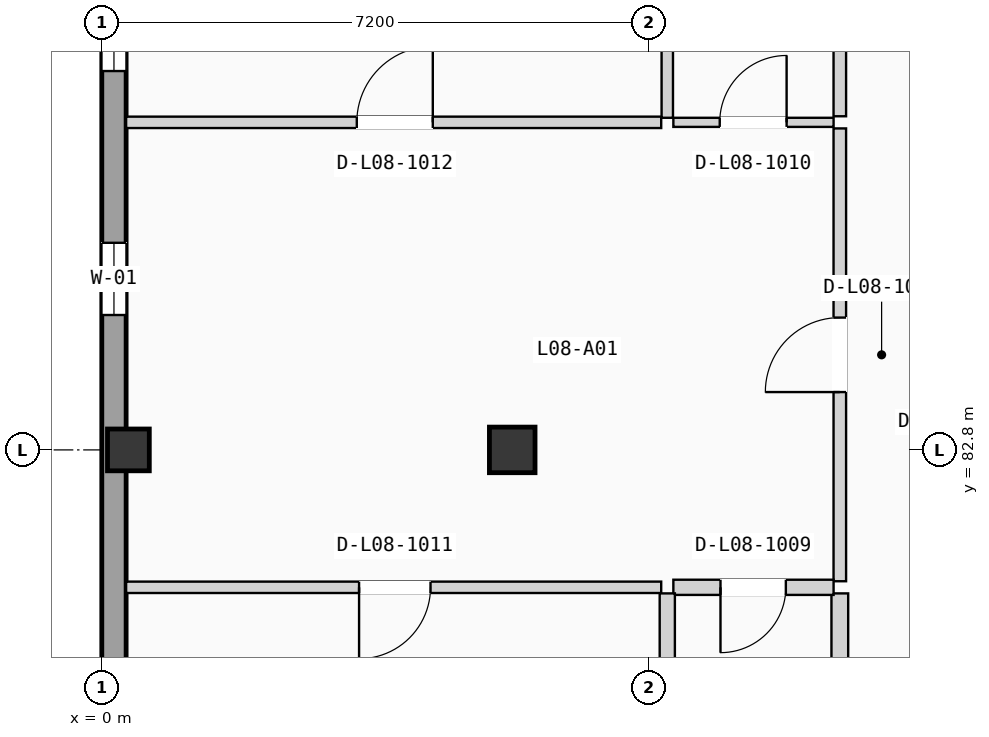
"""IFC4 building model, lengths in metres.
Left out: names, types, materials, properties, quantities, classifications, styles, units other than length and angle.
Written with IfcOpenShell. Run it as: python <this file> out.ifc"""

import sys

from ifc_helpers import new_model, si_unit, direction, frame, frame_2d, origin, origin_2d, place, context, subcontext, project, spatial, rectangle, extrude, element, fill, save


model = new_model("IFC4")
c1 = context("Model", 3, precision=1e-05, world=origin(), true_north=direction((0.0, 1.0)))
c2 = subcontext(c1, "Body", "Model", "MODEL_VIEW")
j1 = project(units=[si_unit("LENGTHUNIT", "METRE"), si_unit("PLANEANGLEUNIT", "RADIAN")], contexts=[c1])
p1 = place(None, origin())
s1 = spatial("IfcSite", under=j1, at=p1, CompositionType="ELEMENT")
p2 = place(p1, origin())
s2 = spatial("IfcBuilding", under=s1, at=p2, CompositionType="ELEMENT")
p3 = place(p2, frame((0.0, 0.0, 27.825)))
s3 = spatial("IfcBuildingStorey", under=s2, at=p3, CompositionType="ELEMENT", Elevation=27.825)
p4 = place(p3, frame((0.35, 82.8, 0.0), z_axis=(0.0, 0.0, 1.0), x_axis=(1.0, 0.0, 0.0)))
e1 = element("IfcColumn", 1, at=p4, inside=s3, PredefinedType="COLUMN", context=c2, shape_type="SweptSolid", body=[
    extrude(rectangle(XDim=0.55, YDim=0.55, at=origin_2d()), origin(), (0.0, 0.0, 1.0), 3.15),
])
p5 = place(p3, frame((5.4, 82.8, 0.0), z_axis=(0.0, 0.0, 1.0), x_axis=(1.0, 0.0, 0.0)))
e2 = element("IfcColumn", 2, at=p5, inside=s3, PredefinedType="COLUMN", context=c2, shape_type="SweptSolid", body=[
    extrude(rectangle(XDim=0.6, YDim=0.6, at=origin_2d()), origin(), (0.0, 0.0, 1.0), 3.15),
])
p6 = place(p3, frame((0.16, 68.72, 0.0), z_axis=(0.0, 0.0, 1.0), x_axis=(0.0, 1.0, 0.0)))
e3 = element("IfcWall", 3, at=p6, inside=s3, PredefinedType="SOLIDWALL", context=c2, shape_type="SweptSolid", body=[
    extrude(rectangle(XDim=49.76, YDim=0.32, at=frame_2d((24.88, 0.0))), origin(), (0.0, 0.0, 1.0), 2.89),
])
p7 = place(p6, frame((15.855, 0.0, 0.85)))
e4 = element("IfcOpeningElement", 4, at=p7, cuts=e3, PredefinedType="OPENING", context=c2, shape_type="SweptSolid", body=[
    extrude(rectangle(XDim=0.95, YDim=1.2, at=frame_2d((0.475, 0.6))), frame((0.0, 0.17, 0.0), z_axis=(0.0, -1.0, 0.0), x_axis=(1.0, 0.0, 0.0)), (0.0, 0.0, 1.0), 0.34),
])
p8 = place(p6, frame((9.061, 0.0, 0.9)))
e5 = element("IfcOpeningElement", 5, at=p8, cuts=e3, PredefinedType="OPENING", context=c2, shape_type="SweptSolid", body=[
    extrude(rectangle(XDim=1.35, YDim=1.2, at=frame_2d((0.675, 0.6))), frame((0.0, 0.17, 0.0), z_axis=(0.0, -1.0, 0.0), x_axis=(1.0, 0.0, 0.0)), (0.0, 0.0, 1.0), 0.34),
])
p9 = place(p6, frame((19.065, 0.0, 0.855)))
e6 = element("IfcOpeningElement", 6, at=p9, cuts=e3, PredefinedType="OPENING", context=c2, shape_type="SweptSolid", body=[
    extrude(rectangle(XDim=1.35, YDim=1.35, at=frame_2d((0.675, 0.675))), frame((0.0, 0.17, 0.0), z_axis=(0.0, -1.0, 0.0), x_axis=(1.0, 0.0, 0.0)), (0.0, 0.0, 1.0), 0.34),
])
p10 = place(p6, frame((31.784, 0.0, 0.705)))
e7 = element("IfcOpeningElement", 7, at=p10, cuts=e3, PredefinedType="OPENING", context=c2, shape_type="SweptSolid", body=[
    extrude(rectangle(XDim=1.35, YDim=1.5, at=frame_2d((0.675, 0.75))), frame((0.0, 0.17, 0.0), z_axis=(0.0, -1.0, 0.0), x_axis=(1.0, 0.0, 0.0)), (0.0, 0.0, 1.0), 0.34),
])
p11 = place(p6, frame((25.211, 0.0, 0.555)))
e8 = element("IfcOpeningElement", 8, at=p11, cuts=e3, PredefinedType="OPENING", context=c2, shape_type="SweptSolid", body=[
    extrude(rectangle(XDim=1.35, YDim=1.65, at=frame_2d((0.675, 0.825))), frame((0.0, 0.17, 0.0), z_axis=(0.0, -1.0, 0.0), x_axis=(1.0, 0.0, 0.0)), (0.0, 0.0, 1.0), 0.34),
])
p12 = place(p6, frame((39.113, 0.0, 0.85)))
e9 = element("IfcOpeningElement", 9, at=p12, cuts=e3, PredefinedType="OPENING", context=c2, shape_type="SweptSolid", body=[
    extrude(rectangle(XDim=0.95, YDim=1.2, at=frame_2d((0.475, 0.6))), frame((0.0, 0.17, 0.0), z_axis=(0.0, -1.0, 0.0), x_axis=(1.0, 0.0, 0.0)), (0.0, 0.0, 1.0), 0.34),
])
p13 = place(p3, frame((9.71, 81.072, 0.0), z_axis=(0.0, 0.0, 1.0), x_axis=(0.0, 1.0, 0.0)))
e10 = element("IfcWall", 10, at=p13, inside=s3, PredefinedType="PARTITIONING", context=c2, shape_type="SweptSolid", body=[
    extrude(rectangle(XDim=5.958, YDim=0.165, at=frame_2d((2.979, 0.0))), origin(), (0.0, 0.0, 1.0), 2.87),
])
p14 = place(p13, frame((2.489, 0.0, 0.0)))
e11 = element("IfcOpeningElement", 11, at=p14, cuts=e10, PredefinedType="OPENING", context=c2, shape_type="SweptSolid", body=[
    extrude(rectangle(XDim=0.98, YDim=2.08, at=frame_2d((0.49, 1.04))), frame((0.0, 0.093, 0.0), z_axis=(0.0, -1.0, 0.0), x_axis=(1.0, 0.0, 0.0)), (0.0, 0.0, 1.0), 0.185),
])
p15 = place(p3, frame((9.71, 76.0, 0.0), z_axis=(0.0, 0.0, 1.0), x_axis=(0.0, 1.0, 0.0)))
e12 = element("IfcWall", 12, at=p15, inside=s3, PredefinedType="PLUMBINGWALL", context=c2, shape_type="SweptSolid", body=[
    extrude(rectangle(XDim=4.912, YDim=0.22, at=frame_2d((2.456, 0.0))), origin(), (0.0, 0.0, 1.0), 2.87),
])
p16 = place(p3, frame((9.71, 87.19, 0.0), z_axis=(0.0, 0.0, 1.0), x_axis=(0.0, 1.0, 0.0)))
e13 = element("IfcWall", 13, at=p16, inside=s3, PredefinedType="PARTITIONING", context=c2, shape_type="SweptSolid", body=[
    extrude(rectangle(XDim=4.912, YDim=0.165, at=frame_2d((2.456, 0.0))), origin(), (0.0, 0.0, 1.0), 2.87),
])
p17 = place(p3, frame((7.52, 80.992, 0.0), z_axis=(0.0, 0.0, 1.0), x_axis=(1.0, 0.0, 0.0)))
e14 = element("IfcWall", 14, at=p17, inside=s3, PredefinedType="PLUMBINGWALL", context=c2, shape_type="SweptSolid", body=[
    extrude(rectangle(XDim=2.108, YDim=0.2, at=frame_2d((1.054, 0.0))), origin(), (0.0, 0.0, 1.0), 2.87),
])
p18 = place(p17, frame((0.62, 0.0, 0.0)))
e15 = element("IfcOpeningElement", 15, at=p18, cuts=e14, PredefinedType="OPENING", context=c2, shape_type="SweptSolid", body=[
    extrude(rectangle(XDim=0.86, YDim=2.0, at=frame_2d((0.43, 1.0))), frame((0.0, 0.11, 0.0), z_axis=(0.0, -1.0, 0.0), x_axis=(1.0, 0.0, 0.0)), (0.0, 0.0, 1.0), 0.22),
])
p19 = place(p3, frame((7.52, 87.11, 0.0), z_axis=(0.0, 0.0, 1.0), x_axis=(1.0, 0.0, 0.0)))
e16 = element("IfcWall", 16, at=p19, inside=s3, PredefinedType="PARTITIONING", context=c2, shape_type="SweptSolid", body=[
    extrude(rectangle(XDim=2.108, YDim=0.12, at=frame_2d((1.054, 0.0))), origin(), (0.0, 0.0, 1.0), 2.87),
])
p20 = place(p19, frame((0.61, 0.0, 0.0)))
e17 = element("IfcOpeningElement", 17, at=p20, cuts=e16, PredefinedType="OPENING", context=c2, shape_type="SweptSolid", body=[
    extrude(rectangle(XDim=0.88, YDim=2.02, at=frame_2d((0.44, 1.01))), frame((0.0, 0.07, 0.0), z_axis=(0.0, -1.0, 0.0), x_axis=(1.0, 0.0, 0.0)), (0.0, 0.0, 1.0), 0.14),
])
p21 = place(p3, frame((0.32, 80.992, 0.0), z_axis=(0.0, 0.0, 1.0), x_axis=(1.0, 0.0, 0.0)))
e18 = element("IfcWall", 18, at=p21, inside=s3, PredefinedType="PARTITIONING", context=c2, shape_type="SweptSolid", body=[
    extrude(rectangle(XDim=7.04, YDim=0.15, at=frame_2d((3.52, 0.0))), origin(), (0.0, 0.0, 1.0), 2.87),
])
p22 = place(p21, frame((3.065, 0.0, 0.0)))
e19 = element("IfcOpeningElement", 19, at=p22, cuts=e18, PredefinedType="OPENING", context=c2, shape_type="SweptSolid", body=[
    extrude(rectangle(XDim=0.94, YDim=2.06, at=frame_2d((0.47, 1.03))), frame((0.0, 0.085, 0.0), z_axis=(0.0, -1.0, 0.0), x_axis=(1.0, 0.0, 0.0)), (0.0, 0.0, 1.0), 0.17),
])
p23 = place(p3, frame((0.32, 87.11, 0.0), z_axis=(0.0, 0.0, 1.0), x_axis=(1.0, 0.0, 0.0)))
e20 = element("IfcWall", 20, at=p23, inside=s3, PredefinedType="PARTITIONING", context=c2, shape_type="SweptSolid", body=[
    extrude(rectangle(XDim=7.04, YDim=0.15, at=frame_2d((3.52, 0.0))), origin(), (0.0, 0.0, 1.0), 2.87),
])
p24 = place(p23, frame((3.035, 0.0, 0.0)))
e21 = element("IfcOpeningElement", 21, at=p24, cuts=e20, PredefinedType="OPENING", context=c2, shape_type="SweptSolid", body=[
    extrude(rectangle(XDim=1.0, YDim=2.06, at=frame_2d((0.5, 1.03))), frame((0.0, 0.085, 0.0), z_axis=(0.0, -1.0, 0.0), x_axis=(1.0, 0.0, 0.0)), (0.0, 0.0, 1.0), 0.17),
])
p25 = place(p3, frame((7.44, 76.0, 0.0), z_axis=(0.0, 0.0, 1.0), x_axis=(0.0, 1.0, 0.0)))
e22 = element("IfcWall", 22, at=p25, inside=s3, PredefinedType="PLUMBINGWALL", context=c2, shape_type="SweptSolid", body=[
    extrude(rectangle(XDim=4.912, YDim=0.2, at=frame_2d((2.456, 0.0))), origin(), (0.0, 0.0, 1.0), 2.87),
])
p26 = place(p3, frame((7.44, 87.17, 0.0), z_axis=(0.0, 0.0, 1.0), x_axis=(0.0, 1.0, 0.0)))
e23 = element("IfcWall", 23, at=p26, inside=s3, PredefinedType="PARTITIONING", context=c2, shape_type="SweptSolid", body=[
    extrude(rectangle(XDim=4.932, YDim=0.15, at=frame_2d((2.466, 0.0))), origin(), (0.0, 0.0, 1.0), 2.87),
])
p27 = place(p7, origin())
e24 = element("IfcWindow", 24, at=p27, inside=s3, PartitioningType="SINGLE_PANEL", PredefinedType="WINDOW", context=c2, shape_type="SweptSolid", body=[
    extrude(rectangle(XDim=0.95, YDim=1.2, at=frame_2d((0.475, 0.6))), frame((0.0, 0.03, 0.0), z_axis=(0.0, -1.0, 0.0), x_axis=(1.0, 0.0, 0.0)), (0.0, 0.0, 1.0), 0.06),
])
fill(e4, e24)
p28 = place(p9, origin())
e25 = element("IfcWindow", 25, at=p28, inside=s3, PartitioningType="SINGLE_PANEL", PredefinedType="WINDOW", context=c2, shape_type="SweptSolid", body=[
    extrude(rectangle(XDim=1.35, YDim=1.35, at=frame_2d((0.675, 0.675))), frame((0.0, 0.03, 0.0), z_axis=(0.0, -1.0, 0.0), x_axis=(1.0, 0.0, 0.0)), (0.0, 0.0, 1.0), 0.06),
])
fill(e6, e25)
p29 = place(p14, origin())
e26 = element("IfcDoor", 26, at=p29, inside=s3, OperationType="SINGLE_SWING_LEFT", PredefinedType="DOOR", context=c2, shape_type="SweptSolid", body=[
    extrude(rectangle(XDim=0.98, YDim=2.08, at=frame_2d((0.49, 1.04))), frame((0.0, 0.025, 0.0), z_axis=(0.0, -1.0, 0.0), x_axis=(1.0, 0.0, 0.0)), (0.0, 0.0, 1.0), 0.05),
])
fill(e11, e26)
p30 = place(p18, frame((0.86, 0.0, 0.0), z_axis=(0.0, 0.0, 1.0), x_axis=(-1.0, 0.0, 0.0)))
e27 = element("IfcDoor", 27, at=p30, inside=s3, OperationType="SINGLE_SWING_LEFT", PredefinedType="DOOR", context=c2, shape_type="SweptSolid", body=[
    extrude(rectangle(XDim=0.86, YDim=2.0, at=frame_2d((0.43, 1.0))), frame((0.0, 0.025, 0.0), z_axis=(0.0, -1.0, 0.0), x_axis=(1.0, 0.0, 0.0)), (0.0, 0.0, 1.0), 0.05),
])
fill(e15, e27)
p31 = place(p20, origin())
e28 = element("IfcDoor", 28, at=p31, inside=s3, OperationType="SINGLE_SWING_RIGHT", PredefinedType="DOOR", context=c2, shape_type="SweptSolid", body=[
    extrude(rectangle(XDim=0.88, YDim=2.02, at=frame_2d((0.44, 1.01))), frame((0.0, 0.025, 0.0), z_axis=(0.0, -1.0, 0.0), x_axis=(1.0, 0.0, 0.0)), (0.0, 0.0, 1.0), 0.05),
])
fill(e17, e28)
p32 = place(p22, frame((0.94, 0.0, 0.0), z_axis=(0.0, 0.0, 1.0), x_axis=(-1.0, 0.0, 0.0)))
e29 = element("IfcDoor", 29, at=p32, inside=s3, OperationType="SINGLE_SWING_LEFT", PredefinedType="DOOR", context=c2, shape_type="SweptSolid", body=[
    extrude(rectangle(XDim=0.94, YDim=2.06, at=frame_2d((0.47, 1.03))), frame((0.0, 0.025, 0.0), z_axis=(0.0, -1.0, 0.0), x_axis=(1.0, 0.0, 0.0)), (0.0, 0.0, 1.0), 0.05),
])
fill(e19, e29)
p33 = place(p24, origin())
e30 = element("IfcDoor", 30, at=p33, inside=s3, OperationType="SINGLE_SWING_RIGHT", PredefinedType="DOOR", context=c2, shape_type="SweptSolid", body=[
    extrude(rectangle(XDim=1.0, YDim=2.06, at=frame_2d((0.5, 1.03))), frame((0.0, 0.025, 0.0), z_axis=(0.0, -1.0, 0.0), x_axis=(1.0, 0.0, 0.0)), (0.0, 0.0, 1.0), 0.05),
])
fill(e21, e30)
save(model, sys.argv[1])
